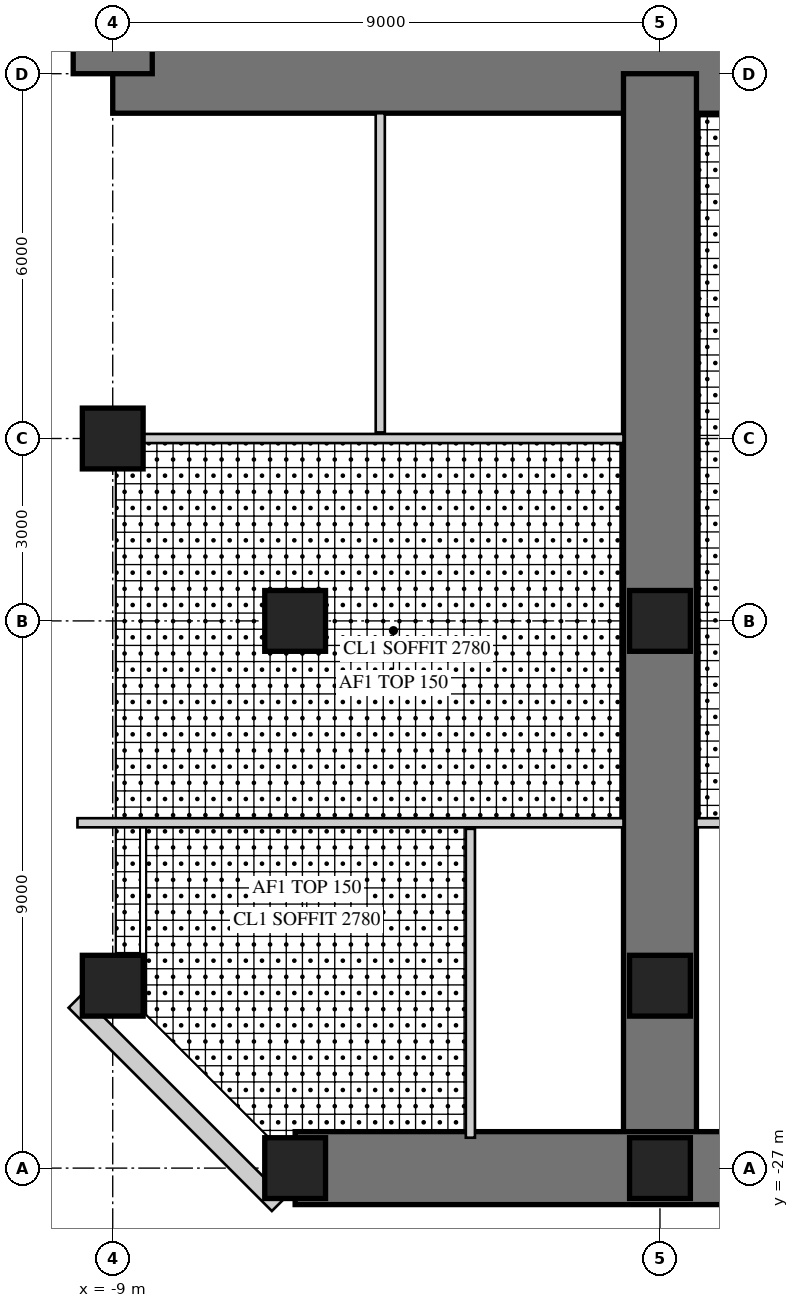
"""IFC4 building model, lengths in metres.
Left out: names, types, materials, properties, quantities, classifications, styles, units other than length and angle.
Written with IfcOpenShell. Run it as: python <this file> out.ifc"""

import sys

from ifc_helpers import new_model, si_unit, direction, frame, frame_2d, origin, origin_2d, place, context, subcontext, project, spatial, rectangle, hollow_rectangle, extrude, element, fill, save


model = new_model("IFC4")
c1 = context("Model", 3, precision=1e-05, world=origin(), true_north=direction((0.0, 1.0)))
c2 = subcontext(c1, "Body", "Model", "MODEL_VIEW")
j1 = project(units=[si_unit("LENGTHUNIT", "METRE"), si_unit("PLANEANGLEUNIT", "RADIAN")], contexts=[c1])
p1 = place(None, origin())
s1 = spatial("IfcSite", under=j1, at=p1, CompositionType="ELEMENT")
p2 = place(p1, origin())
s2 = spatial("IfcBuilding", under=s1, at=p2, CompositionType="ELEMENT")
p3 = place(p2, frame((0.0, 0.0, 152.5)))
s3 = spatial("IfcBuildingStorey", under=s2, at=p3, CompositionType="ELEMENT", Elevation=152.5)
p4 = place(p3, frame((-9.0, -9.0, 0.0), z_axis=(0.0, 0.0, 1.0), x_axis=(1.0, 0.0, 0.0)))
e1 = element("IfcWall", 1, at=p4, inside=s3, PredefinedType="SHEAR", context=c2, shape_type="SweptSolid", body=[
    extrude(rectangle(XDim=18.0, YDim=1.3, at=frame_2d((9.0, 0.0))), origin(), (0.0, 0.0, 1.0), 4.0),
])
p5 = place(p4, frame((9.8, 0.0, 0.0)))
e2 = element("IfcOpeningElement", 2, at=p5, cuts=e1, PredefinedType="OPENING", context=c2, shape_type="SweptSolid", body=[
    extrude(rectangle(XDim=1.0, YDim=2.4, at=frame_2d((0.5, 1.2))), frame((0.0, 0.66, 0.0), z_axis=(0.0, -1.0, 0.0), x_axis=(1.0, 0.0, 0.0)), (0.0, 0.0, 1.0), 1.32),
])
p6 = place(p3, frame((-9.0, 9.0, 0.0), z_axis=(0.0, 0.0, 1.0), x_axis=(0.0, -1.0, 0.0)))
e3 = element("IfcWall", 3, at=p6, inside=s3, PredefinedType="SHEAR", context=c2, shape_type="SweptSolid", body=[
    extrude(rectangle(XDim=18.0, YDim=1.3, at=frame_2d((9.0, 0.0))), origin(), (0.0, 0.0, 1.0), 4.0),
])
p7 = place(p6, frame((9.8, 0.0, 0.0)))
e4 = element("IfcOpeningElement", 4, at=p7, cuts=e3, PredefinedType="OPENING", context=c2, shape_type="SweptSolid", body=[
    extrude(rectangle(XDim=1.0, YDim=2.4, at=frame_2d((0.5, 1.2))), frame((0.0, 0.66, 0.0), z_axis=(0.0, -1.0, 0.0), x_axis=(1.0, 0.0, 0.0)), (0.0, 0.0, 1.0), 1.32),
])
p8 = place(p3, frame((0.0, -9.0, 0.0), z_axis=(0.0, 0.0, 1.0), x_axis=(0.0, -1.0, 0.0)))
e5 = element("IfcWall", 5, at=p8, inside=s3, PredefinedType="SHEAR", context=c2, shape_type="SweptSolid", body=[
    extrude(rectangle(XDim=18.0, YDim=1.2, at=frame_2d((9.0, 0.0))), origin(), (0.0, 0.0, 1.0), 4.0),
])
p9 = place(p8, frame((9.8, 0.0, 0.0)))
e6 = element("IfcOpeningElement", 6, at=p9, cuts=e5, PredefinedType="OPENING", context=c2, shape_type="SweptSolid", body=[
    extrude(rectangle(XDim=1.0, YDim=2.2, at=frame_2d((0.5, 1.1))), frame((0.0, 0.61, 0.0), z_axis=(0.0, -1.0, 0.0), x_axis=(1.0, 0.0, 0.0)), (0.0, 0.0, 1.0), 1.22),
])
p10 = place(p3, frame((-6.0, -27.0, 0.0), z_axis=(0.0, 0.0, 1.0), x_axis=(1.0, 0.0, 0.0)))
e7 = element("IfcWall", 7, at=p10, inside=s3, PredefinedType="SHEAR", context=c2, shape_type="SweptSolid", body=[
    extrude(rectangle(XDim=12.0, YDim=1.2, at=frame_2d((6.0, 0.0))), origin(), (0.0, 0.0, 1.0), 4.0),
])
p11 = place(p10, frame((1.55, 0.0, 0.6)))
e8 = element("IfcOpeningElement", 8, at=p11, cuts=e7, PredefinedType="OPENING", context=c2, shape_type="SweptSolid", body=[
    extrude(rectangle(XDim=3.0, YDim=2.4, at=frame_2d((1.5, 1.2))), frame((0.0, 0.61, 0.0), z_axis=(0.0, -1.0, 0.0), x_axis=(1.0, 0.0, 0.0)), (0.0, 0.0, 1.0), 1.22),
])
p12 = place(p10, frame((7.45, 0.0, 0.6)))
e9 = element("IfcOpeningElement", 9, at=p12, cuts=e7, PredefinedType="OPENING", context=c2, shape_type="SweptSolid", body=[
    extrude(rectangle(XDim=3.0, YDim=2.4, at=frame_2d((1.5, 1.2))), frame((0.0, 0.61, 0.0), z_axis=(0.0, -1.0, 0.0), x_axis=(1.0, 0.0, 0.0)), (0.0, 0.0, 1.0), 1.22),
])
for number, where, z_axis, x_axis in (
    (10, (-9.0, -15.0, 0.0), (0.0, 0.0, 1.0), (1.0, 0.0, 0.0)),
    (11, (-9.0, -24.0, 0.0), (0.0, 0.0, 1.0), (1.0, 0.0, 0.0)),
    (12, (-6.0, -27.0, 0.0), (0.0, 0.0, 1.0), (1.0, 0.0, 0.0)),
    (13, (0.0, -27.0, 0.0), (0.0, 0.0, 1.0), (1.0, 0.0, 0.0)),
    (14, (-6.0, -18.0, 0.0), (0.0, 0.0, 1.0), (1.0, 0.0, 0.0)),
    (15, (0.0, -18.0, 0.0), (0.0, 0.0, 1.0), (1.0, 0.0, 0.0)),
    (16, (0.0, -24.0, 0.0), (0.0, 0.0, 1.0), (1.0, 0.0, 0.0)),
):
    element("IfcColumn", number, at=place(p3, frame(where, z_axis=z_axis, x_axis=x_axis)), inside=s3, PredefinedType="COLUMN", context=c2, shape_type="SweptSolid", body=[
        extrude(rectangle(XDim=1.0, YDim=1.0, at=origin_2d()), origin(), (0.0, 0.0, 1.0), 4.0),
    ])
p13 = place(p3, frame((-9.62, -24.257, 0.0), z_axis=(0.0, 0.0, 1.0), x_axis=(0.707106781187, -0.707106781187, 0.0)))
e17 = element("IfcWall", 17, at=p13, inside=s3, PredefinedType="SOLIDWALL", context=c2, shape_type="SweptSolid", body=[
    extrude(rectangle(XDim=4.728, YDim=0.3, at=frame_2d((2.364, 0.0))), origin(), (0.0, 0.0, 1.0), 3.8),
])
p14 = place(p13, frame((1.914, 0.0, 0.3)))
e18 = element("IfcOpeningElement", 18, at=p14, cuts=e17, PredefinedType="OPENING", context=c2, shape_type="SweptSolid", body=[
    extrude(rectangle(XDim=0.9, YDim=2.4, at=frame_2d((0.45, 1.2))), frame((0.0, 0.16, 0.0), z_axis=(0.0, -1.0, 0.0), x_axis=(1.0, 0.0, 0.0)), (0.0, 0.0, 1.0), 0.32),
])
p15 = place(p3, frame((-8.5, -15.0, 0.0), z_axis=(0.0, 0.0, 1.0), x_axis=(1.0, 0.0, 0.0)))
e19 = element("IfcWall", 19, at=p15, inside=s3, PredefinedType="PARTITIONING", context=c2, shape_type="SweptSolid", body=[
    extrude(rectangle(XDim=7.9, YDim=0.15, at=frame_2d((3.95, 0.0))), origin(), (0.0, 0.0, 1.0), 3.0),
])
p16 = place(p15, frame((1.45, 0.0, 0.0)))
e20 = element("IfcOpeningElement", 20, at=p16, cuts=e19, PredefinedType="OPENING", context=c2, shape_type="SweptSolid", body=[
    extrude(rectangle(XDim=1.0, YDim=2.1, at=frame_2d((0.5, 1.05))), frame((0.0, 0.085, 0.0), z_axis=(0.0, -1.0, 0.0), x_axis=(1.0, 0.0, 0.0)), (0.0, 0.0, 1.0), 0.17),
])
p17 = place(p15, frame((5.4, 0.0, 0.0)))
e21 = element("IfcOpeningElement", 21, at=p17, cuts=e19, PredefinedType="OPENING", context=c2, shape_type="SweptSolid", body=[
    extrude(rectangle(XDim=1.0, YDim=2.1, at=frame_2d((0.5, 1.05))), frame((0.0, 0.085, 0.0), z_axis=(0.0, -1.0, 0.0), x_axis=(1.0, 0.0, 0.0)), (0.0, 0.0, 1.0), 0.17),
])
p18 = place(p3, frame((-4.6, -9.65, 0.0), z_axis=(0.0, 0.0, 1.0), x_axis=(0.0, -1.0, 0.0)))
e22 = element("IfcWall", 22, at=p18, inside=s3, PredefinedType="PARTITIONING", context=c2, shape_type="SweptSolid", body=[
    extrude(rectangle(XDim=5.25, YDim=0.15, at=frame_2d((2.625, 0.0))), origin(), (0.0, 0.0, 1.0), 3.8),
])
p19 = place(p3, frame((0.6, -21.32, 0.0), z_axis=(0.0, 0.0, 1.0), x_axis=(1.0, 0.0, 0.0)))
e23 = element("IfcWall", 23, at=p19, inside=s3, PredefinedType="PARTITIONING", context=c2, shape_type="SweptSolid", body=[
    extrude(rectangle(XDim=8.98, YDim=0.15, at=frame_2d((4.49, 0.0))), origin(), (0.0, 0.0, 1.0), 3.8),
])
p20 = place(p19, frame((0.35, 0.0, 0.0)))
e24 = element("IfcOpeningElement", 24, at=p20, cuts=e23, PredefinedType="OPENING", context=c2, shape_type="SweptSolid", body=[
    extrude(rectangle(XDim=1.0, YDim=2.2, at=frame_2d((0.5, 1.1))), frame((0.0, 0.085, 0.0), z_axis=(0.0, -1.0, 0.0), x_axis=(1.0, 0.0, 0.0)), (0.0, 0.0, 1.0), 0.17),
])
p21 = place(p19, frame((2.993, 0.0, 0.0)))
e25 = element("IfcOpeningElement", 25, at=p21, cuts=e23, PredefinedType="OPENING", context=c2, shape_type="SweptSolid", body=[
    extrude(rectangle(XDim=1.0, YDim=2.2, at=frame_2d((0.5, 1.1))), frame((0.0, 0.085, 0.0), z_axis=(0.0, -1.0, 0.0), x_axis=(1.0, 0.0, 0.0)), (0.0, 0.0, 1.0), 0.17),
])
p22 = place(p3, frame((-3.118, -21.42, 0.0), z_axis=(0.0, 0.0, 1.0), x_axis=(0.0, -1.0, 0.0)))
e26 = element("IfcWall", 26, at=p22, inside=s3, PredefinedType="PARTITIONING", context=c2, shape_type="SweptSolid", body=[
    extrude(rectangle(XDim=5.08, YDim=0.15, at=frame_2d((2.54, 0.0))), origin(), (0.0, 0.0, 1.0), 3.8),
])
p23 = place(p3, frame((-9.58, -21.32, 0.0), z_axis=(0.0, 0.0, 1.0), x_axis=(1.0, 0.0, 0.0)))
e27 = element("IfcWall", 27, at=p23, inside=s3, PredefinedType="PARTITIONING", context=c2, shape_type="SweptSolid", body=[
    extrude(rectangle(XDim=8.98, YDim=0.15, at=frame_2d((4.49, 0.0))), origin(), (0.0, 0.0, 1.0), 3.8),
])
p24 = place(p23, frame((4.987, 0.0, 0.0)))
e28 = element("IfcOpeningElement", 28, at=p24, cuts=e27, PredefinedType="OPENING", context=c2, shape_type="SweptSolid", body=[
    extrude(rectangle(XDim=1.0, YDim=2.2, at=frame_2d((0.5, 1.1))), frame((0.0, 0.085, 0.0), z_axis=(0.0, -1.0, 0.0), x_axis=(1.0, 0.0, 0.0)), (0.0, 0.0, 1.0), 0.17),
])
p25 = place(p23, frame((7.63, 0.0, 0.0)))
e29 = element("IfcOpeningElement", 29, at=p25, cuts=e27, PredefinedType="OPENING", context=c2, shape_type="SweptSolid", body=[
    extrude(rectangle(XDim=1.0, YDim=2.2, at=frame_2d((0.5, 1.1))), frame((0.0, 0.085, 0.0), z_axis=(0.0, -1.0, 0.0), x_axis=(1.0, 0.0, 0.0)), (0.0, 0.0, 1.0), 0.17),
])
p26 = place(p14, origin())
e30 = element("IfcWindow", 30, at=p26, inside=s3, PartitioningType="SINGLE_PANEL", PredefinedType="WINDOW", context=c2, shape_type="SweptSolid", body=[
    extrude(hollow_rectangle(XDim=0.9, YDim=2.4, WallThickness=0.06, at=frame_2d((0.45, 1.2))), frame((0.0, 0.03, 0.0), z_axis=(0.0, -1.0, 0.0), x_axis=(1.0, 0.0, 0.0)), (0.0, 0.0, 1.0), 0.06),
    extrude(rectangle(XDim=0.779, YDim=2.279, at=frame_2d((0.45, 1.2))), frame((0.0, 0.03, 0.0), z_axis=(0.0, -1.0, 0.0), x_axis=(1.0, 0.0, 0.0)), (0.0, 0.0, 1.0), 0.06),
])
fill(e18, e30)
p27 = place(p11, origin())
e31 = element("IfcWindow", 31, at=p27, inside=s3, PartitioningType="SINGLE_PANEL", PredefinedType="WINDOW", context=c2, shape_type="SweptSolid", body=[
    extrude(hollow_rectangle(XDim=3.0, YDim=2.4, WallThickness=0.06, at=frame_2d((1.5, 1.2))), frame((0.0, 0.03, 0.0), z_axis=(0.0, -1.0, 0.0), x_axis=(1.0, 0.0, 0.0)), (0.0, 0.0, 1.0), 0.06),
    extrude(rectangle(XDim=2.879, YDim=2.279, at=frame_2d((1.5, 1.2))), frame((0.0, 0.03, 0.0), z_axis=(0.0, -1.0, 0.0), x_axis=(1.0, 0.0, 0.0)), (0.0, 0.0, 1.0), 0.06),
])
fill(e8, e31)
p28 = place(p16, origin())
e32 = element("IfcDoor", 32, at=p28, inside=s3, OperationType="SINGLE_SWING_RIGHT", PredefinedType="DOOR", context=c2, shape_type="SweptSolid", body=[
    extrude(rectangle(XDim=1.0, YDim=2.1, at=frame_2d((0.5, 1.05))), frame((0.0, 0.025, 0.0), z_axis=(0.0, -1.0, 0.0), x_axis=(1.0, 0.0, 0.0)), (0.0, 0.0, 1.0), 0.05),
])
fill(e20, e32)
p29 = place(p17, origin())
e33 = element("IfcDoor", 33, at=p29, inside=s3, OperationType="SINGLE_SWING_LEFT", PredefinedType="DOOR", context=c2, shape_type="SweptSolid", body=[
    extrude(rectangle(XDim=1.0, YDim=2.1, at=frame_2d((0.5, 1.05))), frame((0.0, 0.025, 0.0), z_axis=(0.0, -1.0, 0.0), x_axis=(1.0, 0.0, 0.0)), (0.0, 0.0, 1.0), 0.05),
])
fill(e21, e33)
p30 = place(p20, frame((1.0, 0.0, 0.0), z_axis=(0.0, 0.0, 1.0), x_axis=(-1.0, 0.0, 0.0)))
e34 = element("IfcDoor", 34, at=p30, inside=s3, OperationType="SINGLE_SWING_RIGHT", PredefinedType="DOOR", context=c2, shape_type="SweptSolid", body=[
    extrude(rectangle(XDim=1.0, YDim=2.2, at=frame_2d((0.5, 1.1))), frame((0.0, 0.025, 0.0), z_axis=(0.0, -1.0, 0.0), x_axis=(1.0, 0.0, 0.0)), (0.0, 0.0, 1.0), 0.05),
])
fill(e24, e34)
p31 = place(p24, frame((1.0, 0.0, 0.0), z_axis=(0.0, 0.0, 1.0), x_axis=(-1.0, 0.0, 0.0)))
e35 = element("IfcDoor", 35, at=p31, inside=s3, OperationType="SINGLE_SWING_LEFT", PredefinedType="DOOR", context=c2, shape_type="SweptSolid", body=[
    extrude(rectangle(XDim=1.0, YDim=2.2, at=frame_2d((0.5, 1.1))), frame((0.0, 0.025, 0.0), z_axis=(0.0, -1.0, 0.0), x_axis=(1.0, 0.0, 0.0)), (0.0, 0.0, 1.0), 0.05),
])
fill(e28, e35)
p32 = place(p25, frame((1.0, 0.0, 0.0), z_axis=(0.0, 0.0, 1.0), x_axis=(-1.0, 0.0, 0.0)))
e36 = element("IfcDoor", 36, at=p32, inside=s3, OperationType="SINGLE_SWING_LEFT", PredefinedType="DOOR", context=c2, shape_type="SweptSolid", body=[
    extrude(rectangle(XDim=1.0, YDim=2.2, at=frame_2d((0.5, 1.1))), frame((0.0, 0.025, 0.0), z_axis=(0.0, -1.0, 0.0), x_axis=(1.0, 0.0, 0.0)), (0.0, 0.0, 1.0), 0.05),
])
fill(e29, e36)
p33 = place(p9, frame((1.0, 0.0, 0.0), z_axis=(0.0, 0.0, 1.0), x_axis=(-1.0, 0.0, 0.0)))
e37 = element("IfcDoor", 37, at=p33, inside=s3, OperationType="SINGLE_SWING_LEFT", PredefinedType="DOOR", context=c2, shape_type="SweptSolid", body=[
    extrude(rectangle(XDim=1.0, YDim=2.2, at=frame_2d((0.5, 1.1))), frame((0.0, 0.025, 0.0), z_axis=(0.0, -1.0, 0.0), x_axis=(1.0, 0.0, 0.0)), (0.0, 0.0, 1.0), 0.05),
])
fill(e6, e37)
p34 = place(p5, frame((1.0, 0.0, 0.0), z_axis=(0.0, 0.0, 1.0), x_axis=(-1.0, 0.0, 0.0)))
e38 = element("IfcDoor", 38, at=p34, inside=s3, OperationType="SINGLE_SWING_RIGHT", PredefinedType="DOOR", context=c2, shape_type="SweptSolid", body=[
    extrude(rectangle(XDim=1.0, YDim=2.4, at=frame_2d((0.5, 1.2))), frame((0.0, -0.005, 0.0), z_axis=(0.0, -1.0, 0.0), x_axis=(1.0, 0.0, 0.0)), (0.0, 0.0, 1.0), 0.05),
])
fill(e2, e38)
save(model, sys.argv[1])
